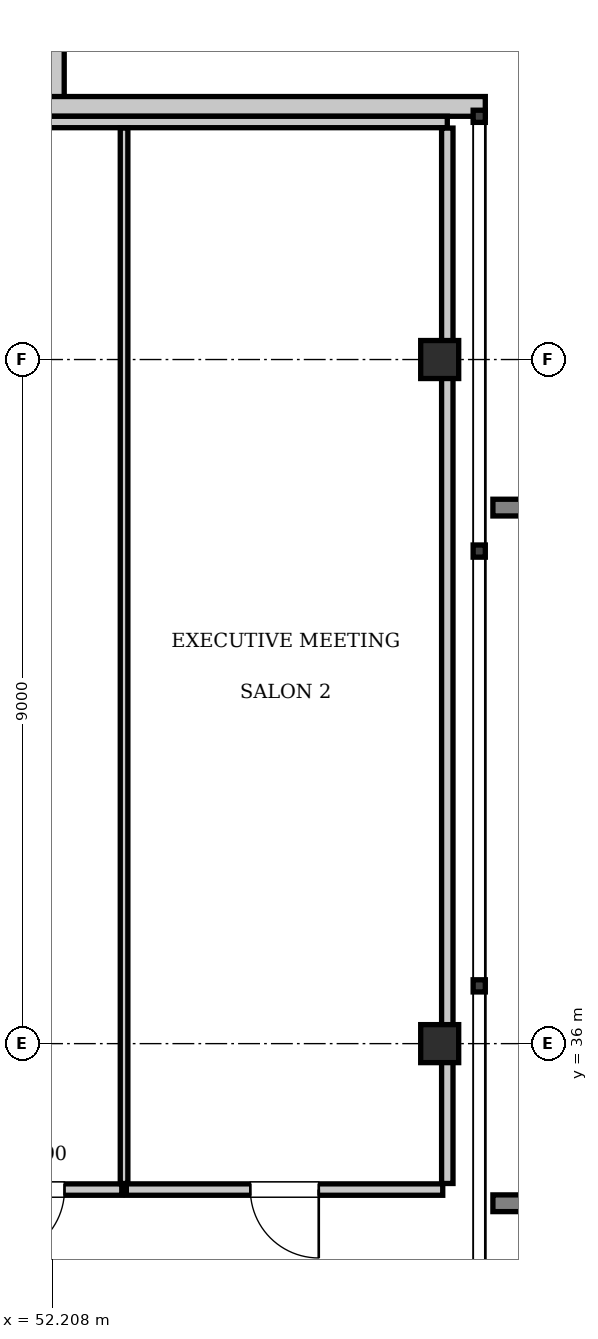
"""IFC4 building model, lengths in metres.
Left out: names, types, materials, properties, quantities, classifications, styles, units other than length and angle.
Written with IfcOpenShell. Run it as: python <this file> out.ifc"""

import sys

from ifc_helpers import new_model, si_unit, direction, frame, frame_2d, origin, origin_2d, place, context, subcontext, project, spatial, rectangle, i_section, extrude, element, fill, save


model = new_model("IFC4")
c1 = context("Model", 3, precision=1e-05, world=origin(), true_north=direction((0.0, 1.0)))
c2 = subcontext(c1, "Body", "Model", "MODEL_VIEW")
j1 = project(units=[si_unit("LENGTHUNIT", "METRE"), si_unit("PLANEANGLEUNIT", "RADIAN")], contexts=[c1])
p1 = place(None, origin())
s1 = spatial("IfcSite", under=j1, at=p1, CompositionType="ELEMENT")
p2 = place(p1, origin())
s2 = spatial("IfcBuilding", under=s1, at=p2, CompositionType="ELEMENT")
p3 = place(p2, frame((0.0, 0.0, 333.55)))
s3 = spatial("IfcBuildingStorey", under=s2, at=p3, CompositionType="ELEMENT", Elevation=333.55)
for number, where, z_axis, x_axis in (
    (1, (57.3, 36.0, 0.0), (0.0, 0.0, 1.0), (1.0, 0.0, 0.0)),
    (2, (57.3, 45.0, 0.0), (0.0, 0.0, 1.0), (1.0, 0.0, 0.0)),
):
    element("IfcColumn", number, at=place(p3, frame(where, z_axis=z_axis, x_axis=x_axis)), inside=s3, PredefinedType="COLUMN", context=c2, shape_type="SweptSolid", body=[
        extrude(i_section(OverallWidth=0.5, OverallDepth=0.5, WebThickness=0.022, FlangeThickness=0.032, at=origin_2d()), origin(), (0.0, 0.0, 1.0), 3.85),
    ])
p4 = place(p3, frame((52.23, 54.0, 0.0), z_axis=(0.0, 0.0, 1.0), x_axis=(0.0, -1.0, 0.0)))
e3 = element("IfcWall", 3, at=p4, inside=s3, PredefinedType="SOLIDWALL", context=c2, shape_type="SweptSolid", body=[
    extrude(rectangle(XDim=5.8, YDim=0.26, at=frame_2d((2.9, 0.0))), origin(), (0.0, 0.0, 1.0), 3.61),
])
p5 = place(p3, frame((52.1, 48.33, 0.0), z_axis=(0.0, 0.0, 1.0), x_axis=(1.0, 0.0, 0.0)))
e4 = element("IfcWall", 4, at=p5, inside=s3, PredefinedType="SOLIDWALL", context=c2, shape_type="SweptSolid", body=[
    extrude(rectangle(XDim=5.8, YDim=0.26, at=frame_2d((2.9, 0.0))), origin(), (0.0, 0.0, 1.0), 3.61),
])
p6 = place(p3, frame((50.65, 48.125, 0.0), z_axis=(0.0, 0.0, 1.0), x_axis=(1.0, 0.0, 0.0)))
e5 = element("IfcWall", 5, at=p6, inside=s3, PredefinedType="PARTITIONING", context=c2, shape_type="SweptSolid", body=[
    extrude(rectangle(XDim=6.75, YDim=0.15, at=frame_2d((3.375, 0.0))), origin(), (0.0, 0.0, 1.0), 3.61),
])
p7 = place(p3, frame((57.4, 34.16, 0.0), z_axis=(0.0, 0.0, 1.0), x_axis=(0.0, 1.0, 0.0)))
e6 = element("IfcWall", 6, at=p7, inside=s3, PredefinedType="PARTITIONING", context=c2, shape_type="SweptSolid", body=[
    extrude(rectangle(XDim=13.885, YDim=0.15, at=frame_2d((6.942, 0.0))), origin(), (0.0, 0.0, 1.0), 3.141),
])
p8 = place(p3, frame((50.71, 34.08, 0.0), z_axis=(0.0, 0.0, 1.0), x_axis=(1.0, 0.0, 0.0)))
e7 = element("IfcWall", 7, at=p8, inside=s3, PredefinedType="PARTITIONING", context=c2, shape_type="SweptSolid", body=[
    extrude(rectangle(XDim=2.407, YDim=0.15, at=frame_2d((1.204, 0.0))), origin(), (0.0, 0.0, 1.0), 3.61),
])
p9 = place(p8, frame((0.754, 0.0, 0.0)))
e8 = element("IfcOpeningElement", 8, at=p9, cuts=e7, PredefinedType="OPENING", context=c2, shape_type="SweptSolid", body=[
    extrude(rectangle(XDim=0.9, YDim=2.1, at=frame_2d((0.45, 1.05))), frame((0.0, 0.085, 0.0), z_axis=(0.0, -1.0, 0.0), x_axis=(1.0, 0.0, 0.0)), (0.0, 0.0, 1.0), 0.17),
])
p10 = place(p3, frame((53.147, 34.16, 0.0), z_axis=(0.0, 0.0, 1.0), x_axis=(0.0, 1.0, 0.0)))
e9 = element("IfcWall", 9, at=p10, inside=s3, PredefinedType="PARTITIONING", context=c2, shape_type="SweptSolid", body=[
    extrude(rectangle(XDim=13.885, YDim=0.1, at=frame_2d((6.942, 0.0))), origin(), (0.0, 0.0, 1.0), 3.61),
])
p11 = place(p3, frame((53.177, 34.08, 0.0), z_axis=(0.0, 0.0, 1.0), x_axis=(1.0, 0.0, 0.0)))
e10 = element("IfcWall", 10, at=p11, inside=s3, PredefinedType="PARTITIONING", context=c2, shape_type="SweptSolid", body=[
    extrude(rectangle(XDim=4.163, YDim=0.15, at=frame_2d((2.081, 0.0))), origin(), (0.0, 0.0, 1.0), 3.61),
])
p12 = place(p11, frame((1.631, 0.0, 0.0)))
e11 = element("IfcOpeningElement", 11, at=p12, cuts=e10, PredefinedType="OPENING", context=c2, shape_type="SweptSolid", body=[
    extrude(rectangle(XDim=0.9, YDim=2.1, at=frame_2d((0.45, 1.05))), frame((0.0, 0.085, 0.0), z_axis=(0.0, -1.0, 0.0), x_axis=(1.0, 0.0, 0.0)), (0.0, 0.0, 1.0), 0.17),
])
p13 = place(p9, frame((0.9, 0.0, 0.0), z_axis=(0.0, 0.0, 1.0), x_axis=(-1.0, 0.0, 0.0)))
e12 = element("IfcDoor", 12, at=p13, inside=s3, OperationType="SINGLE_SWING_RIGHT", PredefinedType="DOOR", context=c2, shape_type="SweptSolid", body=[
    extrude(rectangle(XDim=0.9, YDim=2.1, at=frame_2d((0.45, 1.05))), frame((0.0, 0.025, 0.0), z_axis=(0.0, -1.0, 0.0), x_axis=(1.0, 0.0, 0.0)), (0.0, 0.0, 1.0), 0.05),
])
fill(e8, e12)
p14 = place(p12, frame((0.9, 0.0, 0.0), z_axis=(0.0, 0.0, 1.0), x_axis=(-1.0, 0.0, 0.0)))
e13 = element("IfcDoor", 13, at=p14, inside=s3, OperationType="SINGLE_SWING_LEFT", PredefinedType="DOOR", context=c2, shape_type="SweptSolid", body=[
    extrude(rectangle(XDim=0.9, YDim=2.1, at=frame_2d((0.45, 1.05))), frame((0.0, 0.025, 0.0), z_axis=(0.0, -1.0, 0.0), x_axis=(1.0, 0.0, 0.0)), (0.0, 0.0, 1.0), 0.05),
])
fill(e11, e13)
save(model, sys.argv[1])
